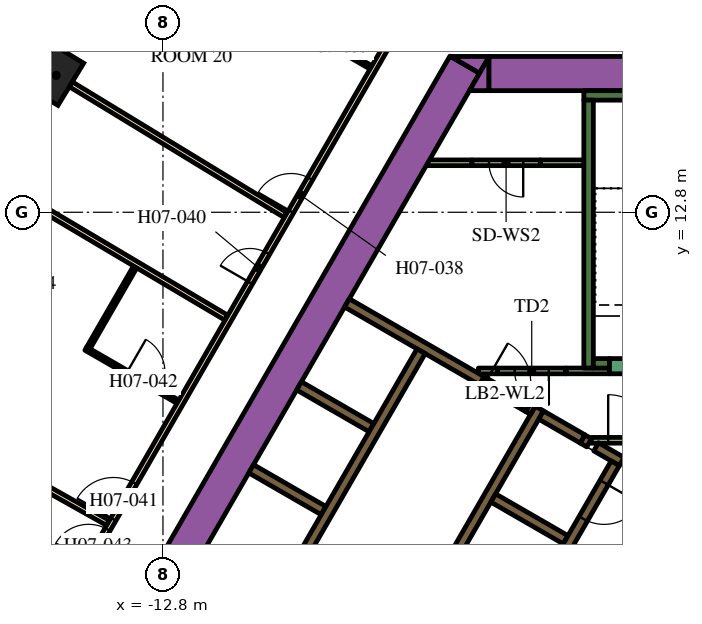
"""IFC4 building model, lengths in metres.
Left out: names, types, materials, properties, quantities, classifications, styles, units other than length and angle.
Written with IfcOpenShell. Run it as: python <this file> out.ifc"""

import sys

from ifc_helpers import new_model, si_unit, direction, frame, frame_2d, origin, origin_2d, place, context, subcontext, project, spatial, polyline, rectangle, outline, extrude, element, fill, save


model = new_model("IFC4")
c1 = context("Model", 3, precision=1e-05, world=origin(), true_north=direction((0.0, 1.0)))
c2 = subcontext(c1, "Body", "Model", "MODEL_VIEW")
j1 = project(units=[si_unit("LENGTHUNIT", "METRE"), si_unit("PLANEANGLEUNIT", "RADIAN")], contexts=[c1])
p1 = place(None, origin())
s1 = spatial("IfcSite", under=j1, at=p1, CompositionType="ELEMENT")
p2 = place(p1, origin())
s2 = spatial("IfcBuilding", under=s1, at=p2, CompositionType="ELEMENT")
p3 = place(p2, frame((0.0, 0.0, 103.2)))
s3 = spatial("IfcBuildingStorey", under=s2, at=p3, CompositionType="ELEMENT", Elevation=103.2)
p4 = place(p3, frame((-15.609, 16.402, 0.0), z_axis=(0.0, 0.0, 1.0), x_axis=(-0.520114019344, -0.854096836946, 0.0)))
e1 = element("IfcColumn", 1, at=p4, inside=s3, PredefinedType="COLUMN", context=c2, shape_type="SweptSolid", body=[
    extrude(rectangle(XDim=1.3, YDim=0.9, at=origin_2d()), origin(), (0.0, 0.0, 1.0), 3.9),
])
p5 = place(p3, frame((-15.36, -1.503, 0.0), z_axis=(0.0, 0.0, 1.0), x_axis=(0.50000389221, 0.866023156604, 0.0)))
e2 = element("IfcWall", 2, at=p5, inside=s3, PredefinedType="SOLIDWALL", context=c2, shape_type="SweptSolid", body=[
    extrude(rectangle(XDim=21.0, YDim=0.9, at=frame_2d((10.5, 0.0))), origin(), (0.0, 0.0, 1.0), 3.9),
])
p6 = place(p3, origin())
e3 = element("IfcWall", 3, at=p6, inside=s3, PredefinedType="SOLIDWALL", context=c2, shape_type="SweptSolid", body=[
    extrude(outline(polyline([(-4.215, 16.9), (-4.469, 16.46), (-5.231, 16.9), (-4.215, 16.9)])), origin(), (0.0, 0.0, 1.0), 3.9),
])
p7 = place(p3, frame((-4.224, 16.45, 0.0), z_axis=(0.0, 0.0, 1.0), x_axis=(1.0, 0.0, 0.0)))
e4 = element("IfcWall", 4, at=p7, inside=s3, PredefinedType="SOLIDWALL", context=c2, shape_type="SweptSolid", body=[
    extrude(rectangle(XDim=9.488, YDim=0.9, at=frame_2d((4.744, 0.0))), origin(), (0.0, 0.0, 1.0), 3.9),
])
e5 = element("IfcWall", 5, at=p6, inside=s3, PredefinedType="SOLIDWALL", context=c2, shape_type="SweptSolid", body=[
    extrude(outline(polyline([(-4.734, 16.0), (-4.226, 16.88), (-4.226, 16.0), (-4.734, 16.0)])), origin(), (0.0, 0.0, 1.0), 3.9),
])
p8 = place(p3, frame((-1.725, 15.875, 0.0), z_axis=(0.0, 0.0, 1.0), x_axis=(1.0, 0.0, 0.0)))
e6 = element("IfcWall", 6, at=p8, inside=s3, PredefinedType="SOLIDWALL", context=c2, shape_type="SweptSolid", body=[
    extrude(rectangle(XDim=3.45, YDim=0.25, at=frame_2d((1.725, 0.0))), origin(), (0.0, 0.0, 1.0), 3.9),
])
p9 = place(p3, frame((-1.6, 8.7, 0.0), z_axis=(0.0, 0.0, 1.0), x_axis=(0.0, 1.0, 0.0)))
e7 = element("IfcWall", 7, at=p9, inside=s3, PredefinedType="SOLIDWALL", context=c2, shape_type="SweptSolid", body=[
    extrude(rectangle(XDim=7.05, YDim=0.25, at=frame_2d((3.525, 0.0))), origin(), (0.0, 0.0, 1.0), 3.9),
])
p10 = place(p3, frame((-1.475, 8.825, 0.0), z_axis=(0.0, 0.0, 1.0), x_axis=(1.0, 0.0, 0.0)))
e8 = element("IfcWall", 8, at=p10, inside=s3, PredefinedType="SOLIDWALL", context=c2, shape_type="SweptSolid", body=[
    extrude(rectangle(XDim=0.425, YDim=0.25, at=frame_2d((0.212, 0.0))), origin(), (0.0, 0.0, 1.0), 3.9),
])
p11 = place(p3, frame((-8.06, -1.311, 0.0), z_axis=(0.0, 0.0, 1.0), x_axis=(0.50000273126, 0.866023826885, 0.0)))
e9 = element("IfcWall", 9, at=p11, inside=s3, PredefinedType="SOLIDWALL", context=c2, shape_type="SweptSolid", body=[
    extrude(rectangle(XDim=10.33, YDim=0.25, at=frame_2d((5.165, 0.0))), origin(), (0.0, 0.0, 1.0), 3.9),
])
p12 = place(p3, frame((-1.758, 6.835, 0.0), z_axis=(0.0, 0.0, 1.0), x_axis=(0.865982457891, -0.500074377092, 0.0)))
e10 = element("IfcWall", 10, at=p12, inside=s3, PredefinedType="SOLIDWALL", context=c2, shape_type="SweptSolid", body=[
    extrude(rectangle(XDim=0.2, YDim=0.25, at=frame_2d((0.1, 0.0))), origin(), (0.0, 0.0, 1.0), 3.9),
])
p13 = place(p3, frame((-1.76, 6.836, 0.0), z_axis=(0.0, 0.0, 1.0), x_axis=(-0.865952863304, 0.500125622755, 0.0)))
e11 = element("IfcWall", 11, at=p13, inside=s3, PredefinedType="SOLIDWALL", context=c2, shape_type="SweptSolid", body=[
    extrude(rectangle(XDim=1.258, YDim=0.25, at=frame_2d((0.629, 0.0))), origin(), (0.0, 0.0, 1.0), 3.9),
])
p14 = place(p3, frame((-0.728, 6.24, 0.0), z_axis=(0.0, 0.0, 1.0), x_axis=(-0.865955664968, 0.500120771724, 0.0)))
e12 = element("IfcWall", 12, at=p14, inside=s3, PredefinedType="SOLIDWALL", context=c2, shape_type="SweptSolid", body=[
    extrude(rectangle(XDim=0.778, YDim=0.25, at=frame_2d((0.389, 0.0))), origin(), (0.0, 0.0, 1.0), 3.9),
])
p15 = place(p3, frame((-2.204, 4.182, 0.0), z_axis=(0.0, 0.0, 1.0), x_axis=(-0.866008176907, 0.50002983664, 0.0)))
e13 = element("IfcWall", 13, at=p15, inside=s3, PredefinedType="SOLIDWALL", context=c2, shape_type="SweptSolid", body=[
    extrude(rectangle(XDim=2.2, YDim=0.25, at=frame_2d((1.1, 0.0))), origin(), (0.0, 0.0, 1.0), 3.9),
])
e14 = element("IfcWall", 14, at=p6, inside=s3, PredefinedType="SOLIDWALL", context=c2, shape_type="SweptSolid", body=[
    extrude(outline(polyline([(-3.128, 7.481), (-3.259, 7.557), (-3.134, 7.773), (-3.003, 7.698), (-3.128, 7.481)])), origin(), (0.0, 0.0, 1.0), 3.9),
])
for number, where, z_axis, x_axis in (
    (15, (-8.574, 4.95, 0.0), (0.0, 0.0, 1.0), (-0.866, 0.5, 0.0)),
    (16, (-7.314, 7.132, 0.0), (0.0, 0.0, 1.0), (-0.866, 0.5, 0.0)),
):
    element("IfcWall", number, at=place(p3, frame(where, z_axis=z_axis, x_axis=x_axis)), inside=s3, PredefinedType="SOLIDWALL", context=c2, shape_type="SweptSolid", body=[
        extrude(rectangle(XDim=2.2, YDim=0.25, at=frame_2d((1.1, 0.0))), origin(), (0.0, 0.0, 1.0), 3.9),
    ])
p16 = place(p3, frame((-7.959, 10.415, 0.0), z_axis=(0.0, 0.0, 1.0), x_axis=(0.866020958405, -0.500007699544, 0.0)))
e17 = element("IfcWall", 17, at=p16, inside=s3, PredefinedType="SOLIDWALL", context=c2, shape_type="SweptSolid", body=[
    extrude(rectangle(XDim=4.1, YDim=0.25, at=frame_2d((2.05, 0.0))), origin(), (0.0, 0.0, 1.0), 3.9),
])
p17 = place(p3, frame((-3.997, 8.625, 0.0), z_axis=(0.0, 0.0, 1.0), x_axis=(-1.0, 0.0, 0.0)))
e18 = element("IfcWall", 18, at=p17, inside=s3, PredefinedType="PARTITIONING", context=c2, shape_type="SweptSolid", body=[
    extrude(rectangle(XDim=0.502, YDim=0.15, at=frame_2d((0.251, 0.0))), origin(), (0.0, 0.0, 1.0), 2.75),
])
p18 = place(p3, frame((-2.196, 8.625, 0.0), z_axis=(0.0, 0.0, 1.0), x_axis=(1.0, 0.0, 0.0)))
e19 = element("IfcWall", 19, at=p18, inside=s3, PredefinedType="PARTITIONING", context=c2, shape_type="SweptSolid", body=[
    extrude(rectangle(XDim=1.146, YDim=0.15, at=frame_2d((0.573, 0.0))), origin(), (0.0, 0.0, 1.0), 2.75),
])
p19 = place(p3, frame((-5.851, 14.102, 0.0), z_axis=(0.0, 0.0, 1.0), x_axis=(1.0, 0.0, 0.0)))
e20 = element("IfcWall", 20, at=p19, inside=s3, PredefinedType="PARTITIONING", context=c2, shape_type="SweptSolid", body=[
    extrude(rectangle(XDim=1.18, YDim=0.15, at=frame_2d((0.59, 0.0))), origin(), (0.0, 0.0, 1.0), 2.75),
])
p20 = place(p3, frame((-2.871, 14.102, 0.0), z_axis=(0.0, 0.0, 1.0), x_axis=(1.0, 0.0, 0.0)))
e21 = element("IfcWall", 21, at=p20, inside=s3, PredefinedType="PARTITIONING", context=c2, shape_type="SweptSolid", body=[
    extrude(rectangle(XDim=1.196, YDim=0.15, at=frame_2d((0.598, 0.0))), origin(), (0.0, 0.0, 1.0), 2.75),
])
p21 = place(p3, frame((-6.008, 9.144, 0.0), z_axis=(0.0, 0.0, 1.0), x_axis=(-0.500006956611, -0.866021387346, 0.0)))
e22 = element("IfcWall", 22, at=p21, inside=s3, PredefinedType="SOLIDWALL", context=c2, shape_type="SweptSolid", body=[
    extrude(rectangle(XDim=9.83, YDim=0.25, at=frame_2d((4.915, 0.0))), origin(), (0.0, 0.0, 1.0), 3.9),
])
p22 = place(p21, frame((6.985, 0.0, 0.0)))
e23 = element("IfcOpeningElement", 23, at=p22, cuts=e22, PredefinedType="OPENING", context=c2, shape_type="SweptSolid", body=[
    extrude(rectangle(XDim=0.9, YDim=2.1, at=frame_2d((0.45, 1.05))), frame((0.0, 0.135, 0.0), z_axis=(0.0, -1.0, 0.0), x_axis=(1.0, 0.0, 0.0)), (0.0, 0.0, 1.0), 0.27),
])
p23 = place(p3, frame((-0.898, 6.194, 0.0), z_axis=(0.0, 0.0, 1.0), x_axis=(-0.499996202215, -0.866027596426, 0.0)))
e24 = element("IfcWall", 24, at=p23, inside=s3, PredefinedType="SOLIDWALL", context=c2, shape_type="SweptSolid", body=[
    extrude(rectangle(XDim=9.83, YDim=0.25, at=frame_2d((4.915, 0.0))), origin(), (0.0, 0.0, 1.0), 3.9),
])
p24 = place(p23, frame((0.585, 0.0, 0.0)))
e25 = element("IfcOpeningElement", 25, at=p24, cuts=e24, PredefinedType="OPENING", context=c2, shape_type="SweptSolid", body=[
    extrude(rectangle(XDim=1.1, YDim=2.1, at=frame_2d((0.55, 1.05))), frame((0.0, 0.135, 0.0), z_axis=(0.0, -1.0, 0.0), x_axis=(1.0, 0.0, 0.0)), (0.0, 0.0, 1.0), 0.27),
])
p25 = place(p23, frame((3.105, 0.0, 0.0)))
e26 = element("IfcOpeningElement", 26, at=p25, cuts=e24, PredefinedType="OPENING", context=c2, shape_type="SweptSolid", body=[
    extrude(rectangle(XDim=1.1, YDim=2.1, at=frame_2d((0.55, 1.05))), frame((0.0, 0.135, 0.0), z_axis=(0.0, -1.0, 0.0), x_axis=(1.0, 0.0, 0.0)), (0.0, 0.0, 1.0), 0.27),
])
p26 = place(p23, frame((5.625, 0.0, 0.0)))
e27 = element("IfcOpeningElement", 27, at=p26, cuts=e24, PredefinedType="OPENING", context=c2, shape_type="SweptSolid", body=[
    extrude(rectangle(XDim=1.1, YDim=2.1, at=frame_2d((0.55, 1.05))), frame((0.0, 0.135, 0.0), z_axis=(0.0, -1.0, 0.0), x_axis=(1.0, 0.0, 0.0)), (0.0, 0.0, 1.0), 0.27),
])
p27 = place(p23, frame((8.145, 0.0, 0.0)))
e28 = element("IfcOpeningElement", 28, at=p27, cuts=e24, PredefinedType="OPENING", context=c2, shape_type="SweptSolid", body=[
    extrude(rectangle(XDim=1.1, YDim=2.1, at=frame_2d((0.55, 1.05))), frame((0.0, 0.135, 0.0), z_axis=(0.0, -1.0, 0.0), x_axis=(1.0, 0.0, 0.0)), (0.0, 0.0, 1.0), 0.27),
])
p28 = place(p3, frame((1.05, 8.75, 0.0), z_axis=(0.0, 0.0, 1.0), x_axis=(-1.0, 0.0, 0.0)))
e29 = element("IfcWall", 29, at=p28, inside=s3, PredefinedType="SOLIDWALL", context=c2, shape_type="SweptSolid", body=[
    extrude(rectangle(XDim=2.1, YDim=0.4, at=frame_2d((1.05, 0.0))), origin(), (0.0, 0.0, 1.0), 3.9),
])
p29 = place(p28, frame((0.45, 0.0, 0.0)))
e30 = element("IfcOpeningElement", 30, at=p29, cuts=e29, PredefinedType="OPENING", context=c2, shape_type="SweptSolid", body=[
    extrude(rectangle(XDim=1.2, YDim=2.1, at=frame_2d((0.6, 1.05))), frame((0.0, 0.21, 0.0), z_axis=(0.0, -1.0, 0.0), x_axis=(1.0, 0.0, 0.0)), (0.0, 0.0, 1.0), 0.42),
])
p30 = place(p3, frame((-2.196, 8.625, 0.0), z_axis=(0.0, 0.0, 1.0), x_axis=(-1.0, 0.0, 0.0)))
e31 = element("IfcWall", 31, at=p30, inside=s3, PredefinedType="PARTITIONING", context=c2, shape_type="SweptSolid", body=[
    extrude(rectangle(XDim=1.8, YDim=0.15, at=frame_2d((0.9, 0.0))), origin(), (0.0, 0.0, 1.0), 2.75),
])
p31 = place(p30, frame((0.45, 0.0, 0.0)))
e32 = element("IfcOpeningElement", 32, at=p31, cuts=e31, PredefinedType="OPENING", context=c2, shape_type="SweptSolid", body=[
    extrude(rectangle(XDim=0.9, YDim=2.1, at=frame_2d((0.45, 1.05))), frame((0.0, 0.085, 0.0), z_axis=(0.0, -1.0, 0.0), x_axis=(1.0, 0.0, 0.0)), (0.0, 0.0, 1.0), 0.17),
])
p32 = place(p3, frame((-1.534, 6.8, 0.0), z_axis=(0.0, 0.0, 1.0), x_axis=(1.0, 0.0, 0.0)))
e33 = element("IfcWall", 33, at=p32, inside=s3, PredefinedType="PARTITIONING", context=c2, shape_type="SweptSolid", body=[
    extrude(rectangle(XDim=2.1, YDim=0.15, at=frame_2d((1.05, 0.0))), origin(), (0.0, 0.0, 1.0), 2.75),
])
p33 = place(p32, frame((0.45, 0.0, 0.0)))
e34 = element("IfcOpeningElement", 34, at=p33, cuts=e33, PredefinedType="OPENING", context=c2, shape_type="SweptSolid", body=[
    extrude(rectangle(XDim=1.2, YDim=2.1, at=frame_2d((0.6, 1.05))), frame((0.0, 0.085, 0.0), z_axis=(0.0, -1.0, 0.0), x_axis=(1.0, 0.0, 0.0)), (0.0, 0.0, 1.0), 0.17),
])
p34 = place(p3, frame((-4.409, 8.365, 0.0), z_axis=(0.0, 0.0, 1.0), x_axis=(0.866034573852, -0.49998411664, 0.0)))
e35 = element("IfcWall", 35, at=p34, inside=s3, PredefinedType="SOLIDWALL", context=c2, shape_type="SweptSolid", body=[
    extrude(rectangle(XDim=1.4, YDim=0.25, at=frame_2d((0.7, 0.0))), origin(), (0.0, 0.0, 1.0), 3.9),
])
p35 = place(p34, frame((0.1, 0.0, 0.0)))
e36 = element("IfcOpeningElement", 36, at=p35, cuts=e35, PredefinedType="OPENING", context=c2, shape_type="SweptSolid", body=[
    extrude(rectangle(XDim=1.2, YDim=2.1, at=frame_2d((0.6, 1.05))), frame((0.0, 0.135, 0.0), z_axis=(0.0, -1.0, 0.0), x_axis=(1.0, 0.0, 0.0)), (0.0, 0.0, 1.0), 0.27),
])
p36 = place(p3, frame((-2.871, 14.102, 0.0), z_axis=(0.0, 0.0, 1.0), x_axis=(-1.0, 0.0, 0.0)))
e37 = element("IfcWall", 37, at=p36, inside=s3, PredefinedType="PARTITIONING", context=c2, shape_type="SweptSolid", body=[
    extrude(rectangle(XDim=1.8, YDim=0.15, at=frame_2d((0.9, 0.0))), origin(), (0.0, 0.0, 1.0), 2.75),
])
p37 = place(p36, frame((0.45, 0.0, 0.0)))
e38 = element("IfcOpeningElement", 38, at=p37, cuts=e37, PredefinedType="OPENING", context=c2, shape_type="SweptSolid", body=[
    extrude(rectangle(XDim=0.9, YDim=2.1, at=frame_2d((0.45, 1.05))), frame((0.0, 0.085, 0.0), z_axis=(0.0, -1.0, 0.0), x_axis=(1.0, 0.0, 0.0)), (0.0, 0.0, 1.0), 0.17),
])
p38 = place(p3, frame((-19.081, -3.9, 0.0), z_axis=(0.0, 0.0, 1.0), x_axis=(0.499998313975, 0.866026377209, 0.0)))
e39 = element("IfcWall", 39, at=p38, inside=s3, PredefinedType="PARTITIONING", context=c2, shape_type="SweptSolid", body=[
    extrude(rectangle(XDim=25.766, YDim=0.15, at=frame_2d((12.883, 0.0))), origin(), (0.0, 0.0, 1.0), 2.75),
])
p39 = place(p38, frame((19.306, 0.0, 0.0)))
e40 = element("IfcOpeningElement", 40, at=p39, cuts=e39, PredefinedType="OPENING", context=c2, shape_type="SweptSolid", body=[
    extrude(rectangle(XDim=1.0, YDim=2.1, at=frame_2d((0.5, 1.05))), frame((0.0, 0.085, 0.0), z_axis=(0.0, -1.0, 0.0), x_axis=(1.0, 0.0, 0.0)), (0.0, 0.0, 1.0), 0.17),
])
p40 = place(p38, frame((17.144, 0.0, 0.0)))
e41 = element("IfcOpeningElement", 41, at=p40, cuts=e39, PredefinedType="OPENING", context=c2, shape_type="SweptSolid", body=[
    extrude(rectangle(XDim=0.9, YDim=2.1, at=frame_2d((0.45, 1.05))), frame((0.0, 0.085, 0.0), z_axis=(0.0, -1.0, 0.0), x_axis=(1.0, 0.0, 0.0)), (0.0, 0.0, 1.0), 0.17),
])
p41 = place(p38, frame((9.955, 0.0, 0.0)))
e42 = element("IfcOpeningElement", 42, at=p41, cuts=e39, PredefinedType="OPENING", context=c2, shape_type="SweptSolid", body=[
    extrude(rectangle(XDim=1.1, YDim=2.1, at=frame_2d((0.55, 1.05))), frame((0.0, 0.085, 0.0), z_axis=(0.0, -1.0, 0.0), x_axis=(1.0, 0.0, 0.0)), (0.0, 0.0, 1.0), 0.17),
])
p42 = place(p38, frame((8.648, 0.0, 0.0)))
e43 = element("IfcOpeningElement", 43, at=p42, cuts=e39, PredefinedType="OPENING", context=c2, shape_type="SweptSolid", body=[
    extrude(rectangle(XDim=1.0, YDim=2.1, at=frame_2d((0.5, 1.05))), frame((0.0, 0.085, 0.0), z_axis=(0.0, -1.0, 0.0), x_axis=(1.0, 0.0, 0.0)), (0.0, 0.0, 1.0), 0.17),
])
p43 = place(p38, frame((1.553, 0.0, 0.0)))
e44 = element("IfcOpeningElement", 44, at=p43, cuts=e39, PredefinedType="OPENING", context=c2, shape_type="SweptSolid", body=[
    extrude(rectangle(XDim=0.9, YDim=2.1, at=frame_2d((0.45, 1.05))), frame((0.0, 0.085, 0.0), z_axis=(0.0, -1.0, 0.0), x_axis=(1.0, 0.0, 0.0)), (0.0, 0.0, 1.0), 0.17),
])
for number, where, z_axis, x_axis in (
    (45, (-20.581, 8.185, 0.0), (0.0, 0.0, 1.0), (0.872, -0.49, 0.0)),
    (46, (-17.379, 13.731, 0.0), (0.0, 0.0, 1.0), (0.86, -0.51, 0.0)),
):
    element("IfcWall", number, at=place(p3, frame(where, z_axis=z_axis, x_axis=x_axis)), inside=s3, PredefinedType="PARTITIONING", context=c2, shape_type="SweptSolid", body=[
        extrude(rectangle(XDim=7.257, YDim=0.15, at=frame_2d((3.628, 0.0))), origin(), (0.0, 0.0, 1.0), 2.75),
    ])
p44 = place(p3, frame((-15.225, 16.167, 0.0), z_axis=(0.0, 0.0, 1.0), x_axis=(0.854088713274, -0.520127359266, 0.0)))
e47 = element("IfcWall", 47, at=p44, inside=s3, PredefinedType="PARTITIONING", context=c2, shape_type="SweptSolid", body=[
    extrude(rectangle(XDim=6.611, YDim=0.15, at=frame_2d((3.305, 0.0))), origin(), (0.0, 0.0, 1.0), 2.75),
])
p45 = place(p3, frame((-9.578, 17.911, 0.0), z_axis=(0.0, 0.0, 1.0), x_axis=(0.866021400173, -0.500006934395, 0.0)))
e48 = element("IfcWall", 48, at=p45, inside=s3, PredefinedType="PARTITIONING", context=c2, shape_type="SweptSolid", body=[
    extrude(rectangle(XDim=2.6, YDim=0.1, at=frame_2d((1.3, 0.0))), origin(), (0.0, 0.0, 1.0), 2.75),
])
p46 = place(p45, frame((1.1, 0.0, 0.0)))
e49 = element("IfcOpeningElement", 49, at=p46, cuts=e48, PredefinedType="OPENING", context=c2, shape_type="SweptSolid", body=[
    extrude(rectangle(XDim=0.9, YDim=2.1, at=frame_2d((0.45, 1.05))), frame((0.0, 0.06, 0.0), z_axis=(0.0, -1.0, 0.0), x_axis=(1.0, 0.0, 0.0)), (0.0, 0.0, 1.0), 0.12),
])
p47 = place(p3, frame((-14.83, 9.213, 0.0), z_axis=(0.0, 0.0, 1.0), x_axis=(0.866034573852, -0.49998411664, 0.0)))
e50 = element("IfcWall", 50, at=p47, inside=s3, PredefinedType="PARTITIONING", context=c2, shape_type="SweptSolid", body=[
    extrude(rectangle(XDim=2.8, YDim=0.1, at=frame_2d((1.4, 0.0))), origin(), (0.0, 0.0, 1.0), 2.75),
])
p48 = place(p47, frame((1.25, 0.0, 0.0)))
e51 = element("IfcOpeningElement", 51, at=p48, cuts=e50, PredefinedType="OPENING", context=c2, shape_type="SweptSolid", body=[
    extrude(rectangle(XDim=1.0, YDim=2.1, at=frame_2d((0.5, 1.05))), frame((0.0, 0.06, 0.0), z_axis=(0.0, -1.0, 0.0), x_axis=(1.0, 0.0, 0.0)), (0.0, 0.0, 1.0), 0.12),
])
p49 = place(p3, frame((-14.762, 9.231, 0.0), z_axis=(0.0, 0.0, 1.0), x_axis=(0.500003092839, 0.866023618125, 0.0)))
e52 = element("IfcWall", 52, at=p49, inside=s3, PredefinedType="PARTITIONING", context=c2, shape_type="SweptSolid", body=[
    extrude(rectangle(XDim=2.46, YDim=0.1, at=frame_2d((1.23, 0.0))), origin(), (0.0, 0.0, 1.0), 2.75),
])
p50 = place(p24, origin())
e53 = element("IfcDoor", 53, at=p50, inside=s3, OperationType="DOUBLE_DOOR_SLIDING", PredefinedType="DOOR", context=c2, shape_type="SweptSolid", body=[
    extrude(rectangle(XDim=1.1, YDim=2.1, at=frame_2d((0.55, 1.05))), frame((0.0, 0.025, 0.0), z_axis=(0.0, -1.0, 0.0), x_axis=(1.0, 0.0, 0.0)), (0.0, 0.0, 1.0), 0.05),
])
fill(e25, e53)
p51 = place(p31, origin())
e54 = element("IfcDoor", 54, at=p51, inside=s3, OperationType="SINGLE_SWING_LEFT", PredefinedType="DOOR", context=c2, shape_type="SweptSolid", body=[
    extrude(rectangle(XDim=0.9, YDim=2.1, at=frame_2d((0.45, 1.05))), frame((0.0, 0.025, 0.0), z_axis=(0.0, -1.0, 0.0), x_axis=(1.0, 0.0, 0.0)), (0.0, 0.0, 1.0), 0.05),
])
fill(e32, e54)
p52 = place(p33, origin())
e55 = element("IfcDoor", 55, at=p52, inside=s3, OperationType="SINGLE_SWING_LEFT", PredefinedType="DOOR", context=c2, shape_type="SweptSolid", body=[
    extrude(rectangle(XDim=1.2, YDim=2.1, at=frame_2d((0.6, 1.05))), frame((0.0, 0.025, 0.0), z_axis=(0.0, -1.0, 0.0), x_axis=(1.0, 0.0, 0.0)), (0.0, 0.0, 1.0), 0.05),
])
fill(e34, e55)
p53 = place(p35, origin())
e56 = element("IfcDoor", 56, at=p53, inside=s3, OperationType="SINGLE_SWING_LEFT", PredefinedType="DOOR", context=c2, shape_type="SweptSolid", body=[
    extrude(rectangle(XDim=1.2, YDim=2.1, at=frame_2d((0.6, 1.05))), frame((0.0, 0.025, 0.0), z_axis=(0.0, -1.0, 0.0), x_axis=(1.0, 0.0, 0.0)), (0.0, 0.0, 1.0), 0.05),
])
fill(e36, e56)
p54 = place(p37, origin())
e57 = element("IfcDoor", 57, at=p54, inside=s3, OperationType="SINGLE_SWING_LEFT", PredefinedType="DOOR", context=c2, shape_type="SweptSolid", body=[
    extrude(rectangle(XDim=0.9, YDim=2.1, at=frame_2d((0.45, 1.05))), frame((0.0, 0.025, 0.0), z_axis=(0.0, -1.0, 0.0), x_axis=(1.0, 0.0, 0.0)), (0.0, 0.0, 1.0), 0.05),
])
fill(e38, e57)
p55 = place(p39, origin())
e58 = element("IfcDoor", 58, at=p55, inside=s3, OperationType="SINGLE_SWING_LEFT", PredefinedType="DOOR", context=c2, shape_type="SweptSolid", body=[
    extrude(rectangle(XDim=1.0, YDim=2.1, at=frame_2d((0.5, 1.05))), frame((0.0, 0.025, 0.0), z_axis=(0.0, -1.0, 0.0), x_axis=(1.0, 0.0, 0.0)), (0.0, 0.0, 1.0), 0.05),
])
fill(e40, e58)
p56 = place(p46, origin())
e59 = element("IfcDoor", 59, at=p56, inside=s3, OperationType="SINGLE_SWING_LEFT", PredefinedType="DOOR", context=c2, shape_type="SweptSolid", body=[
    extrude(rectangle(XDim=0.9, YDim=2.1, at=frame_2d((0.45, 1.05))), frame((0.0, 0.025, 0.0), z_axis=(0.0, -1.0, 0.0), x_axis=(1.0, 0.0, 0.0)), (0.0, 0.0, 1.0), 0.05),
])
fill(e49, e59)
p57 = place(p40, origin())
e60 = element("IfcDoor", 60, at=p57, inside=s3, OperationType="SINGLE_SWING_LEFT", PredefinedType="DOOR", context=c2, shape_type="SweptSolid", body=[
    extrude(rectangle(XDim=0.9, YDim=2.1, at=frame_2d((0.45, 1.05))), frame((0.0, 0.025, 0.0), z_axis=(0.0, -1.0, 0.0), x_axis=(1.0, 0.0, 0.0)), (0.0, 0.0, 1.0), 0.05),
])
fill(e41, e60)
p58 = place(p41, origin())
e61 = element("IfcDoor", 61, at=p58, inside=s3, OperationType="SINGLE_SWING_LEFT", PredefinedType="DOOR", context=c2, shape_type="SweptSolid", body=[
    extrude(rectangle(XDim=1.1, YDim=2.1, at=frame_2d((0.55, 1.05))), frame((0.0, 0.025, 0.0), z_axis=(0.0, -1.0, 0.0), x_axis=(1.0, 0.0, 0.0)), (0.0, 0.0, 1.0), 0.05),
])
fill(e42, e61)
p59 = place(p48, origin())
e62 = element("IfcDoor", 62, at=p59, inside=s3, OperationType="SINGLE_SWING_LEFT", PredefinedType="DOOR", context=c2, shape_type="SweptSolid", body=[
    extrude(rectangle(XDim=1.0, YDim=2.1, at=frame_2d((0.5, 1.05))), frame((0.0, 0.025, 0.0), z_axis=(0.0, -1.0, 0.0), x_axis=(1.0, 0.0, 0.0)), (0.0, 0.0, 1.0), 0.05),
])
fill(e51, e62)
p60 = place(p42, origin())
e63 = element("IfcDoor", 63, at=p60, inside=s3, OperationType="SINGLE_SWING_RIGHT", PredefinedType="DOOR", context=c2, shape_type="SweptSolid", body=[
    extrude(rectangle(XDim=1.0, YDim=2.1, at=frame_2d((0.5, 1.05))), frame((0.0, 0.025, 0.0), z_axis=(0.0, -1.0, 0.0), x_axis=(1.0, 0.0, 0.0)), (0.0, 0.0, 1.0), 0.05),
])
fill(e43, e63)
save(model, sys.argv[1])
